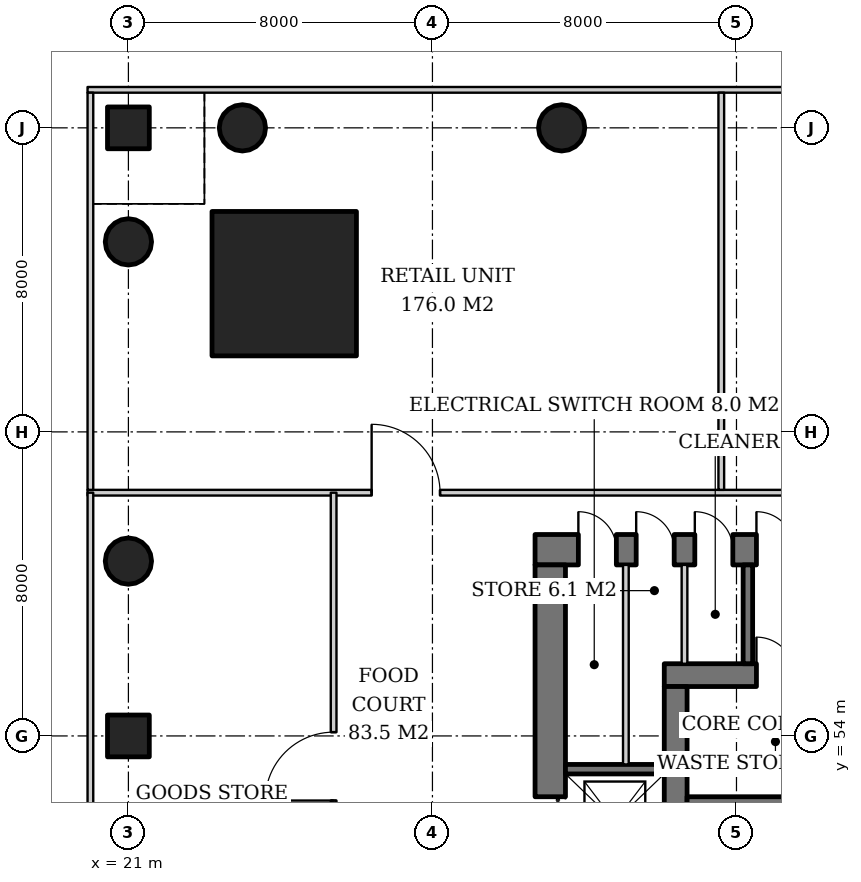
"""IFC4 building model, lengths in metres.
Left out: names, types, materials, properties, quantities, classifications, styles, units other than length and angle.
Written with IfcOpenShell. Run it as: python <this file> out.ifc"""

import sys

from ifc_helpers import new_model, si_unit, direction, frame, frame_2d, origin, origin_2d, place, context, subcontext, project, spatial, rectangle, hollow_circle, extrude, element, fill, save


model = new_model("IFC4")
c1 = context("Model", 3, precision=1e-05, world=origin(), true_north=direction((0.0, 1.0)))
c2 = subcontext(c1, "Body", "Model", "MODEL_VIEW")
j1 = project(units=[si_unit("LENGTHUNIT", "METRE"), si_unit("PLANEANGLEUNIT", "RADIAN")], contexts=[c1])
p1 = place(None, origin())
s1 = spatial("IfcSite", under=j1, at=p1, CompositionType="ELEMENT")
p2 = place(p1, origin())
s2 = spatial("IfcBuilding", under=s1, at=p2, CompositionType="ELEMENT")
p3 = place(p2, frame((0.0, 0.0, 6.0)))
s3 = spatial("IfcBuildingStorey", under=s2, at=p3, CompositionType="ELEMENT", Elevation=6.0)
p4 = place(p3, frame((25.1, 65.9, 0.0), z_axis=(0.0, 0.0, 1.0), x_axis=(1.0, 0.0, 0.0)))
e1 = element("IfcColumn", 1, at=p4, inside=s3, PredefinedType="COLUMN", context=c2, shape_type="SweptSolid", body=[
    extrude(rectangle(XDim=3.8, YDim=3.8, at=origin_2d()), origin(), (0.0, 0.0, 1.0), 5.0),
])
for number, where, z_axis, x_axis in (
    (2, (24.0, 70.0, 0.0), (0.0, 0.0, 1.0), (1.0, 0.0, 0.0)),
    (3, (32.4, 70.0, 0.0), (0.0, 0.0, 1.0), (1.0, 0.0, 0.0)),
    (4, (21.0, 67.0, 0.0), (0.0, 0.0, 1.0), (1.0, 0.0, 0.0)),
    (5, (21.0, 58.6, 0.0), (0.0, 0.0, 1.0), (1.0, 0.0, 0.0)),
):
    element("IfcColumn", number, at=place(p3, frame(where, z_axis=z_axis, x_axis=x_axis)), inside=s3, PredefinedType="COLUMN", context=c2, shape_type="SweptSolid", body=[
        extrude(hollow_circle(Radius=0.61, WallThickness=0.04, at=origin_2d()), origin(), (0.0, 0.0, 1.0), 5.0),
    ])
p5 = place(p3, frame((35.1, 55.6, 0.0), z_axis=(0.0, 0.0, 1.0), x_axis=(1.0, 0.0, 0.0)))
e6 = element("IfcWall", 6, at=p5, inside=s3, PredefinedType="SHEAR", context=c2, shape_type="SweptSolid", body=[
    extrude(rectangle(XDim=19.8, YDim=0.6, at=frame_2d((9.9, 0.0))), origin(), (0.0, 0.0, 1.0), 5.0),
])
p6 = place(p5, frame((14.54, 0.0, 0.0)))
e7 = element("IfcOpeningElement", 7, at=p6, cuts=e6, PredefinedType="OPENING", context=c2, shape_type="SweptSolid", body=[
    extrude(rectangle(XDim=1.0, YDim=2.1, at=frame_2d((0.5, 1.05))), frame((0.0, 0.31, 0.0), z_axis=(0.0, -1.0, 0.0), x_axis=(1.0, 0.0, 0.0)), (0.0, 0.0, 1.0), 0.62),
])
p7 = place(p5, frame((12.18, 0.0, 0.0)))
e8 = element("IfcOpeningElement", 8, at=p7, cuts=e6, PredefinedType="OPENING", context=c2, shape_type="SweptSolid", body=[
    extrude(rectangle(XDim=1.0, YDim=2.1, at=frame_2d((0.5, 1.05))), frame((0.0, 0.31, 0.0), z_axis=(0.0, -1.0, 0.0), x_axis=(1.0, 0.0, 0.0)), (0.0, 0.0, 1.0), 0.62),
])
p8 = place(p5, frame((2.425, 0.0, 0.0)))
e9 = element("IfcOpeningElement", 9, at=p8, cuts=e6, PredefinedType="OPENING", context=c2, shape_type="SweptSolid", body=[
    extrude(rectangle(XDim=1.0, YDim=2.1, at=frame_2d((0.5, 1.05))), frame((0.0, 0.31, 0.0), z_axis=(0.0, -1.0, 0.0), x_axis=(1.0, 0.0, 0.0)), (0.0, 0.0, 1.0), 0.62),
])
p9 = place(p3, frame((35.4, 36.7, 0.0), z_axis=(0.0, 0.0, 1.0), x_axis=(0.0, 1.0, 0.0)))
e10 = element("IfcWall", 10, at=p9, inside=s3, PredefinedType="SHEAR", context=c2, shape_type="SweptSolid", body=[
    extrude(rectangle(XDim=18.6, YDim=0.6, at=frame_2d((9.3, 0.0))), origin(), (0.0, 0.0, 1.0), 5.0),
])
p10 = place(p9, frame((8.4, 0.0, 0.0)))
e11 = element("IfcOpeningElement", 11, at=p10, cuts=e10, PredefinedType="OPENING", context=c2, shape_type="SweptSolid", body=[
    extrude(rectangle(XDim=1.8, YDim=2.4, at=frame_2d((0.9, 1.2))), frame((0.0, 0.31, 0.0), z_axis=(0.0, -1.0, 0.0), x_axis=(1.0, 0.0, 0.0)), (0.0, 0.0, 1.0), 0.62),
])
p11 = place(p3, frame((31.7, 58.9, 0.0), z_axis=(0.0, 0.0, 1.0), x_axis=(1.0, 0.0, 0.0)))
e12 = element("IfcWall", 12, at=p11, inside=s3, PredefinedType="SHEAR", context=c2, shape_type="SweptSolid", body=[
    extrude(rectangle(XDim=26.6, YDim=0.8, at=frame_2d((13.3, 0.0))), origin(), (0.0, 0.0, 1.0), 5.0),
])
p12 = place(p11, frame((17.94, 0.0, 0.0)))
e13 = element("IfcOpeningElement", 13, at=p12, cuts=e12, PredefinedType="OPENING", context=c2, shape_type="SweptSolid", body=[
    extrude(rectangle(XDim=1.0, YDim=2.1, at=frame_2d((0.5, 1.05))), frame((0.0, 0.41, 0.0), z_axis=(0.0, -1.0, 0.0), x_axis=(1.0, 0.0, 0.0)), (0.0, 0.0, 1.0), 0.82),
])
p13 = place(p11, frame((12.44, 0.0, 0.0)))
e14 = element("IfcOpeningElement", 14, at=p13, cuts=e12, PredefinedType="OPENING", context=c2, shape_type="SweptSolid", body=[
    extrude(rectangle(XDim=1.0, YDim=2.1, at=frame_2d((0.5, 1.05))), frame((0.0, 0.41, 0.0), z_axis=(0.0, -1.0, 0.0), x_axis=(1.0, 0.0, 0.0)), (0.0, 0.0, 1.0), 0.82),
])
p14 = place(p11, frame((5.825, 0.0, 0.0)))
e15 = element("IfcOpeningElement", 15, at=p14, cuts=e12, PredefinedType="OPENING", context=c2, shape_type="SweptSolid", body=[
    extrude(rectangle(XDim=1.0, YDim=2.1, at=frame_2d((0.5, 1.05))), frame((0.0, 0.41, 0.0), z_axis=(0.0, -1.0, 0.0), x_axis=(1.0, 0.0, 0.0)), (0.0, 0.0, 1.0), 0.82),
])
p15 = place(p11, frame((1.139, 0.0, 0.0)))
e16 = element("IfcOpeningElement", 16, at=p15, cuts=e12, PredefinedType="OPENING", context=c2, shape_type="SweptSolid", body=[
    extrude(rectangle(XDim=1.0, YDim=2.1, at=frame_2d((0.5, 1.05))), frame((0.0, 0.41, 0.0), z_axis=(0.0, -1.0, 0.0), x_axis=(1.0, 0.0, 0.0)), (0.0, 0.0, 1.0), 0.82),
])
p16 = place(p11, frame((2.661, 0.0, 0.0)))
e17 = element("IfcOpeningElement", 17, at=p16, cuts=e12, PredefinedType="OPENING", context=c2, shape_type="SweptSolid", body=[
    extrude(rectangle(XDim=1.0, YDim=2.1, at=frame_2d((0.5, 1.05))), frame((0.0, 0.41, 0.0), z_axis=(0.0, -1.0, 0.0), x_axis=(1.0, 0.0, 0.0)), (0.0, 0.0, 1.0), 0.82),
])
p17 = place(p11, frame((4.204, 0.0, 0.0)))
e18 = element("IfcOpeningElement", 18, at=p17, cuts=e12, PredefinedType="OPENING", context=c2, shape_type="SweptSolid", body=[
    extrude(rectangle(XDim=1.0, YDim=2.1, at=frame_2d((0.5, 1.05))), frame((0.0, 0.41, 0.0), z_axis=(0.0, -1.0, 0.0), x_axis=(1.0, 0.0, 0.0)), (0.0, 0.0, 1.0), 0.82),
])
p18 = place(p11, frame((20.875, 0.0, 0.0)))
e19 = element("IfcOpeningElement", 19, at=p18, cuts=e12, PredefinedType="OPENING", context=c2, shape_type="SweptSolid", body=[
    extrude(rectangle(XDim=1.0, YDim=2.1, at=frame_2d((0.5, 1.05))), frame((0.0, 0.41, 0.0), z_axis=(0.0, -1.0, 0.0), x_axis=(1.0, 0.0, 0.0)), (0.0, 0.0, 1.0), 0.82),
])
p19 = place(p11, frame((23.7, 0.0, 0.0)))
e20 = element("IfcOpeningElement", 20, at=p19, cuts=e12, PredefinedType="OPENING", context=c2, shape_type="SweptSolid", body=[
    extrude(rectangle(XDim=1.0, YDim=2.1, at=frame_2d((0.5, 1.05))), frame((0.0, 0.41, 0.0), z_axis=(0.0, -1.0, 0.0), x_axis=(1.0, 0.0, 0.0)), (0.0, 0.0, 1.0), 0.82),
])
p20 = place(p3, frame((32.1, 33.5, 0.0), z_axis=(0.0, 0.0, 1.0), x_axis=(0.0, 1.0, 0.0)))
e21 = element("IfcWall", 21, at=p20, inside=s3, PredefinedType="SHEAR", context=c2, shape_type="SweptSolid", body=[
    extrude(rectangle(XDim=25.0, YDim=0.8, at=frame_2d((12.5, 0.0))), origin(), (0.0, 0.0, 1.0), 5.0),
])
p21 = place(p20, frame((3.35, 0.0, 0.0)))
e22 = element("IfcOpeningElement", 22, at=p21, cuts=e21, PredefinedType="OPENING", context=c2, shape_type="SweptSolid", body=[
    extrude(rectangle(XDim=1.3, YDim=2.2, at=frame_2d((0.65, 1.1))), frame((0.0, 0.41, 0.0), z_axis=(0.0, -1.0, 0.0), x_axis=(1.0, 0.0, 0.0)), (0.0, 0.0, 1.0), 0.82),
])
p22 = place(p20, frame((6.1, 0.0, 0.0)))
e23 = element("IfcOpeningElement", 23, at=p22, cuts=e21, PredefinedType="OPENING", context=c2, shape_type="SweptSolid", body=[
    extrude(rectangle(XDim=1.3, YDim=2.2, at=frame_2d((0.65, 1.1))), frame((0.0, 0.41, 0.0), z_axis=(0.0, -1.0, 0.0), x_axis=(1.0, 0.0, 0.0)), (0.0, 0.0, 1.0), 0.82),
])
p23 = place(p20, frame((8.85, 0.0, 0.0)))
e24 = element("IfcOpeningElement", 24, at=p23, cuts=e21, PredefinedType="OPENING", context=c2, shape_type="SweptSolid", body=[
    extrude(rectangle(XDim=1.3, YDim=2.2, at=frame_2d((0.65, 1.1))), frame((0.0, 0.41, 0.0), z_axis=(0.0, -1.0, 0.0), x_axis=(1.0, 0.0, 0.0)), (0.0, 0.0, 1.0), 0.82),
])
p24 = place(p20, frame((14.85, 0.0, 0.0)))
e25 = element("IfcOpeningElement", 25, at=p24, cuts=e21, PredefinedType="OPENING", context=c2, shape_type="SweptSolid", body=[
    extrude(rectangle(XDim=1.3, YDim=2.2, at=frame_2d((0.65, 1.1))), frame((0.0, 0.41, 0.0), z_axis=(0.0, -1.0, 0.0), x_axis=(1.0, 0.0, 0.0)), (0.0, 0.0, 1.0), 0.82),
])
p25 = place(p20, frame((17.6, 0.0, 0.0)))
e26 = element("IfcOpeningElement", 26, at=p25, cuts=e21, PredefinedType="OPENING", context=c2, shape_type="SweptSolid", body=[
    extrude(rectangle(XDim=1.3, YDim=2.2, at=frame_2d((0.65, 1.1))), frame((0.0, 0.41, 0.0), z_axis=(0.0, -1.0, 0.0), x_axis=(1.0, 0.0, 0.0)), (0.0, 0.0, 1.0), 0.82),
])
p26 = place(p20, frame((11.6, 0.0, 0.0)))
e27 = element("IfcOpeningElement", 27, at=p26, cuts=e21, PredefinedType="OPENING", context=c2, shape_type="SweptSolid", body=[
    extrude(rectangle(XDim=1.8, YDim=2.4, at=frame_2d((0.9, 1.2))), frame((0.0, 0.41, 0.0), z_axis=(0.0, -1.0, 0.0), x_axis=(1.0, 0.0, 0.0)), (0.0, 0.0, 1.0), 0.82),
])
p27 = place(p3, frame((35.7, 52.2, 0.0), z_axis=(0.0, 0.0, 1.0), x_axis=(1.0, 0.0, 0.0)))
e28 = element("IfcWall", 28, at=p27, inside=s3, PredefinedType="SHEAR", context=c2, shape_type="SweptSolid", body=[
    extrude(rectangle(XDim=18.6, YDim=0.4, at=frame_2d((9.3, 0.0))), origin(), (0.0, 0.0, 1.0), 5.0),
])
for number, where, z_axis, x_axis in (
    (29, (21.0, 54.0, 0.0), (0.0, 0.0, 1.0), (1.0, 0.0, 0.0)),
    (30, (21.0, 70.0, 0.0), (0.0, 0.0, 1.0), (1.0, 0.0, 0.0)),
):
    element("IfcColumn", number, at=place(p3, frame(where, z_axis=z_axis, x_axis=x_axis)), inside=s3, PredefinedType="COLUMN", context=c2, shape_type="SweptSolid", body=[
        extrude(rectangle(XDim=1.1, YDim=1.1, at=origin_2d()), origin(), (0.0, 0.0, 1.0), 5.0),
    ])
p28 = place(p3, frame((32.5, 53.125, 0.0), z_axis=(0.0, 0.0, 1.0), x_axis=(1.0, 0.0, 0.0)))
e31 = element("IfcWall", 31, at=p28, inside=s3, PredefinedType="SHEAR", context=c2, shape_type="SweptSolid", body=[
    extrude(rectangle(XDim=2.6, YDim=0.25, at=frame_2d((1.3, 0.0))), origin(), (0.0, 0.0, 1.0), 5.0),
])
p29 = place(p3, frame((37.3, 55.9, 0.0), z_axis=(0.0, 0.0, 1.0), x_axis=(0.0, 1.0, 0.0)))
e32 = element("IfcWall", 32, at=p29, inside=s3, PredefinedType="SOLIDWALL", context=c2, shape_type="SweptSolid", body=[
    extrude(rectangle(XDim=2.6, YDim=0.25, at=frame_2d((1.3, 0.0))), origin(), (0.0, 0.0, 1.0), 4.7),
])
p30 = place(p3, frame((34.09, 53.25, 0.0), z_axis=(0.0, 0.0, 1.0), x_axis=(0.0, 1.0, 0.0)))
e33 = element("IfcWall", 33, at=p30, inside=s3, PredefinedType="SOLIDWALL", context=c2, shape_type="SweptSolid", body=[
    extrude(rectangle(XDim=5.25, YDim=0.15, at=frame_2d((2.625, 0.0))), origin(), (0.0, 0.0, 1.0), 4.7),
])
p31 = place(p3, frame((35.632, 55.9, 0.0), z_axis=(0.0, 0.0, 1.0), x_axis=(0.0, 1.0, 0.0)))
e34 = element("IfcWall", 34, at=p31, inside=s3, PredefinedType="SOLIDWALL", context=c2, shape_type="SweptSolid", body=[
    extrude(rectangle(XDim=2.6, YDim=0.15, at=frame_2d((1.3, 0.0))), origin(), (0.0, 0.0, 1.0), 4.7),
])
p32 = place(p3, frame((19.925, 60.4, 0.0), z_axis=(0.0, 0.0, 1.0), x_axis=(1.0, 0.0, 0.0)))
e35 = element("IfcWall", 35, at=p32, inside=s3, PredefinedType="PARTITIONING", context=c2, shape_type="SweptSolid", body=[
    extrude(rectangle(XDim=50.15, YDim=0.15, at=frame_2d((25.075, 0.0))), origin(), (0.0, 0.0, 1.0), 3.688),
])
p33 = place(p32, frame((7.475, 0.0, 0.0)))
e36 = element("IfcOpeningElement", 36, at=p33, cuts=e35, PredefinedType="OPENING", context=c2, shape_type="SweptSolid", body=[
    extrude(rectangle(XDim=1.8, YDim=2.4, at=frame_2d((0.9, 1.2))), frame((0.0, 0.085, 0.0), z_axis=(0.0, -1.0, 0.0), x_axis=(1.0, 0.0, 0.0)), (0.0, 0.0, 1.0), 0.17),
])
p34 = place(p32, frame((19.975, 0.0, 0.0)))
e37 = element("IfcOpeningElement", 37, at=p34, cuts=e35, PredefinedType="OPENING", context=c2, shape_type="SweptSolid", body=[
    extrude(rectangle(XDim=1.8, YDim=2.4, at=frame_2d((0.9, 1.2))), frame((0.0, 0.085, 0.0), z_axis=(0.0, -1.0, 0.0), x_axis=(1.0, 0.0, 0.0)), (0.0, 0.0, 1.0), 0.17),
])
p35 = place(p32, frame((28.375, 0.0, 0.0)))
e38 = element("IfcOpeningElement", 38, at=p35, cuts=e35, PredefinedType="OPENING", context=c2, shape_type="SweptSolid", body=[
    extrude(rectangle(XDim=1.8, YDim=2.4, at=frame_2d((0.9, 1.2))), frame((0.0, 0.085, 0.0), z_axis=(0.0, -1.0, 0.0), x_axis=(1.0, 0.0, 0.0)), (0.0, 0.0, 1.0), 0.17),
])
p36 = place(p32, frame((40.875, 0.0, 0.0)))
e39 = element("IfcOpeningElement", 39, at=p36, cuts=e35, PredefinedType="OPENING", context=c2, shape_type="SweptSolid", body=[
    extrude(rectangle(XDim=1.8, YDim=2.4, at=frame_2d((0.9, 1.2))), frame((0.0, 0.085, 0.0), z_axis=(0.0, -1.0, 0.0), x_axis=(1.0, 0.0, 0.0)), (0.0, 0.0, 1.0), 0.17),
])
p37 = place(p3, frame((19.925, 71.0, 0.0), z_axis=(0.0, 0.0, 1.0), x_axis=(1.0, 0.0, 0.0)))
e40 = element("IfcWall", 40, at=p37, inside=s3, PredefinedType="PARTITIONING", context=c2, shape_type="SweptSolid", body=[
    extrude(rectangle(XDim=50.15, YDim=0.15, at=frame_2d((25.075, 0.0))), origin(), (0.0, 0.0, 1.0), 4.7),
])
p38 = place(p3, frame((20.0, 60.475, 0.0), z_axis=(0.0, 0.0, 1.0), x_axis=(0.0, 1.0, 0.0)))
e41 = element("IfcWall", 41, at=p38, inside=s3, PredefinedType="PARTITIONING", context=c2, shape_type="SweptSolid", body=[
    extrude(rectangle(XDim=10.45, YDim=0.15, at=frame_2d((5.225, 0.0))), origin(), (0.0, 0.0, 1.0), 4.7),
])
p39 = place(p3, frame((36.6, 60.475, 0.0), z_axis=(0.0, 0.0, 1.0), x_axis=(0.0, 1.0, 0.0)))
e42 = element("IfcWall", 42, at=p39, inside=s3, PredefinedType="PARTITIONING", context=c2, shape_type="SweptSolid", body=[
    extrude(rectangle(XDim=10.45, YDim=0.15, at=frame_2d((5.225, 0.0))), origin(), (0.0, 0.0, 1.0), 4.08),
])
p40 = place(p3, frame((20.0, 31.6, 0.0), z_axis=(0.0, 0.0, 1.0), x_axis=(0.0, 1.0, 0.0)))
e43 = element("IfcWall", 43, at=p40, inside=s3, PredefinedType="PARTITIONING", context=c2, shape_type="SweptSolid", body=[
    extrude(rectangle(XDim=28.8, YDim=0.15, at=frame_2d((14.4, 0.0))), origin(), (0.0, 0.0, 1.0), 3.2),
])
p41 = place(p3, frame((26.4, 31.6, 0.0), z_axis=(0.0, 0.0, 1.0), x_axis=(0.0, 1.0, 0.0)))
e44 = element("IfcWall", 44, at=p41, inside=s3, PredefinedType="PARTITIONING", context=c2, shape_type="SweptSolid", body=[
    extrude(rectangle(XDim=28.8, YDim=0.15, at=frame_2d((14.4, 0.0))), origin(), (0.0, 0.0, 1.0), 3.688),
])
p42 = place(p41, frame((6.45, 0.0, 0.0)))
e45 = element("IfcOpeningElement", 45, at=p42, cuts=e44, PredefinedType="OPENING", context=c2, shape_type="SweptSolid", body=[
    extrude(rectangle(XDim=1.5, YDim=2.1, at=frame_2d((0.75, 1.05))), frame((0.0, 0.085, 0.0), z_axis=(0.0, -1.0, 0.0), x_axis=(1.0, 0.0, 0.0)), (0.0, 0.0, 1.0), 0.17),
])
p43 = place(p41, frame((20.7, 0.0, 0.0)))
e46 = element("IfcOpeningElement", 46, at=p43, cuts=e44, PredefinedType="OPENING", context=c2, shape_type="SweptSolid", body=[
    extrude(rectangle(XDim=1.8, YDim=2.4, at=frame_2d((0.9, 1.2))), frame((0.0, 0.085, 0.0), z_axis=(0.0, -1.0, 0.0), x_axis=(1.0, 0.0, 0.0)), (0.0, 0.0, 1.0), 0.17),
])
p44 = place(p25, origin())
e47 = element("IfcDoor", 47, at=p44, inside=s3, OperationType="DOUBLE_DOOR_SLIDING", PredefinedType="DOOR", context=c2, shape_type="SweptSolid", body=[
    extrude(rectangle(XDim=1.3, YDim=2.2, at=frame_2d((0.65, 1.1))), frame((0.0, 0.025, 0.0), z_axis=(0.0, -1.0, 0.0), x_axis=(1.0, 0.0, 0.0)), (0.0, 0.0, 1.0), 0.05),
])
fill(e26, e47)
p45 = place(p14, origin())
e48 = element("IfcDoor", 48, at=p45, inside=s3, OperationType="SINGLE_SWING_LEFT", PredefinedType="DOOR", context=c2, shape_type="SweptSolid", body=[
    extrude(rectangle(XDim=1.0, YDim=2.1, at=frame_2d((0.5, 1.05))), frame((0.0, 0.025, 0.0), z_axis=(0.0, -1.0, 0.0), x_axis=(1.0, 0.0, 0.0)), (0.0, 0.0, 1.0), 0.05),
])
fill(e15, e48)
p46 = place(p8, origin())
e49 = element("IfcDoor", 49, at=p46, inside=s3, OperationType="SINGLE_SWING_LEFT", PredefinedType="DOOR", context=c2, shape_type="SweptSolid", body=[
    extrude(rectangle(XDim=1.0, YDim=2.1, at=frame_2d((0.5, 1.05))), frame((0.0, -0.24, 0.0), z_axis=(0.0, -1.0, 0.0), x_axis=(1.0, 0.0, 0.0)), (0.0, 0.0, 1.0), 0.05),
])
fill(e9, e49)
p47 = place(p15, origin())
e50 = element("IfcDoor", 50, at=p47, inside=s3, OperationType="SINGLE_SWING_LEFT", PredefinedType="DOOR", context=c2, shape_type="SweptSolid", body=[
    extrude(rectangle(XDim=1.0, YDim=2.1, at=frame_2d((0.5, 1.05))), frame((0.0, -0.34, 0.0), z_axis=(0.0, -1.0, 0.0), x_axis=(1.0, 0.0, 0.0)), (0.0, 0.0, 1.0), 0.05),
])
fill(e16, e50)
p48 = place(p16, origin())
e51 = element("IfcDoor", 51, at=p48, inside=s3, OperationType="SINGLE_SWING_LEFT", PredefinedType="DOOR", context=c2, shape_type="SweptSolid", body=[
    extrude(rectangle(XDim=1.0, YDim=2.1, at=frame_2d((0.5, 1.05))), frame((0.0, -0.34, 0.0), z_axis=(0.0, -1.0, 0.0), x_axis=(1.0, 0.0, 0.0)), (0.0, 0.0, 1.0), 0.05),
])
fill(e17, e51)
p49 = place(p17, origin())
e52 = element("IfcDoor", 52, at=p49, inside=s3, OperationType="SINGLE_SWING_LEFT", PredefinedType="DOOR", context=c2, shape_type="SweptSolid", body=[
    extrude(rectangle(XDim=1.0, YDim=2.1, at=frame_2d((0.5, 1.05))), frame((0.0, -0.34, 0.0), z_axis=(0.0, -1.0, 0.0), x_axis=(1.0, 0.0, 0.0)), (0.0, 0.0, 1.0), 0.05),
])
fill(e18, e52)
p50 = place(p33, origin())
e53 = element("IfcDoor", 53, at=p50, inside=s3, OperationType="DOUBLE_DOOR_SINGLE_SWING", PredefinedType="DOOR", context=c2, shape_type="SweptSolid", body=[
    extrude(rectangle(XDim=1.8, YDim=2.4, at=frame_2d((0.9, 1.2))), frame((0.0, 0.025, 0.0), z_axis=(0.0, -1.0, 0.0), x_axis=(1.0, 0.0, 0.0)), (0.0, 0.0, 1.0), 0.05),
])
fill(e36, e53)
p51 = place(p43, origin())
e54 = element("IfcDoor", 54, at=p51, inside=s3, OperationType="DOUBLE_DOOR_SINGLE_SWING", PredefinedType="DOOR", context=c2, shape_type="SweptSolid", body=[
    extrude(rectangle(XDim=1.8, YDim=2.4, at=frame_2d((0.9, 1.2))), frame((0.0, 0.025, 0.0), z_axis=(0.0, -1.0, 0.0), x_axis=(1.0, 0.0, 0.0)), (0.0, 0.0, 1.0), 0.05),
])
fill(e46, e54)
save(model, sys.argv[1])
